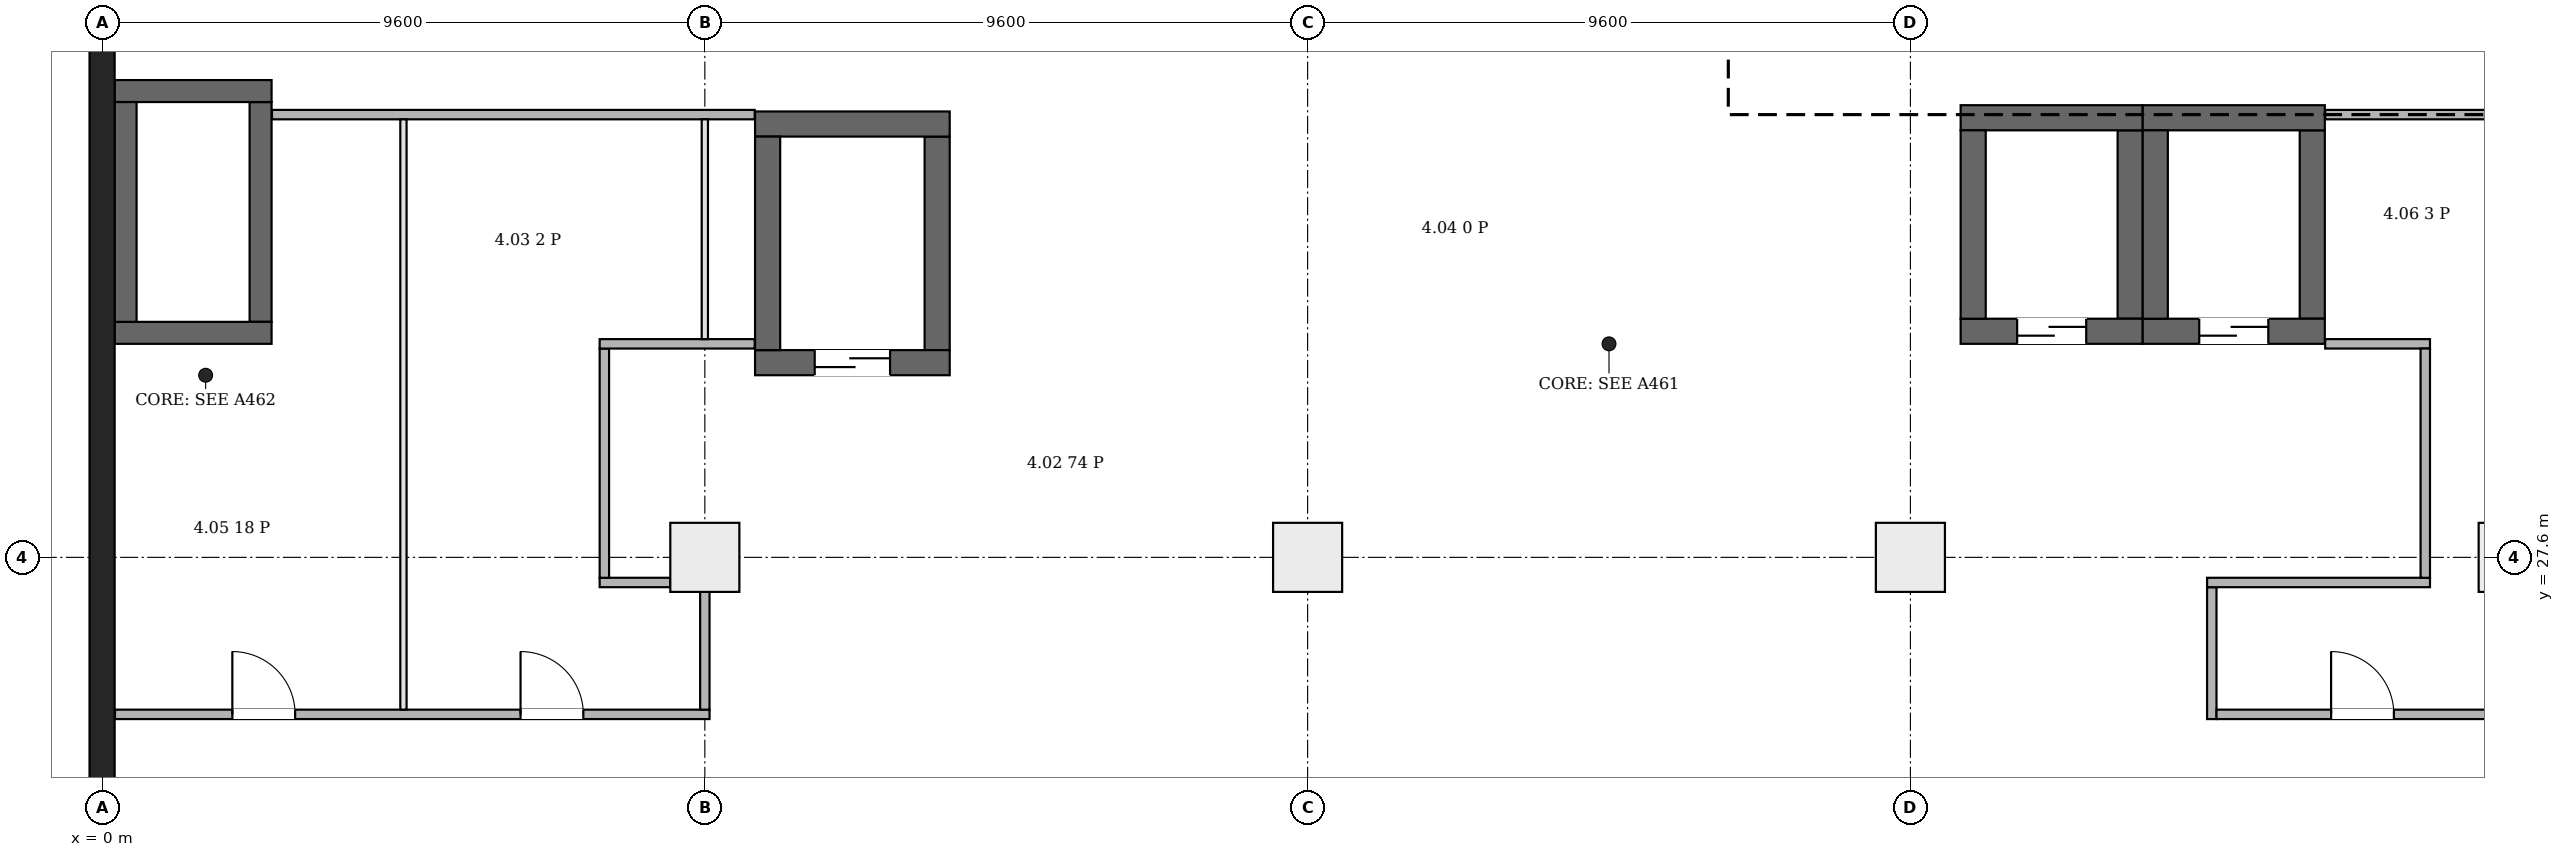
"""IFC4 building model, lengths in metres.
Left out: names, types, materials, properties, quantities, classifications, styles, units other than length and angle.
Written with IfcOpenShell. Run it as: python <this file> out.ifc"""

import sys

from ifc_helpers import new_model, si_unit, direction, frame, frame_2d, origin, origin_2d, place, context, subcontext, project, spatial, rectangle, extrude, element, fill, save


model = new_model("IFC4")
c1 = context("Model", 3, precision=1e-05, world=origin(), true_north=direction((0.0, 1.0)))
c2 = subcontext(c1, "Body", "Model", "MODEL_VIEW")
j1 = project(units=[si_unit("LENGTHUNIT", "METRE"), si_unit("PLANEANGLEUNIT", "RADIAN")], contexts=[c1])
p1 = place(None, origin())
s1 = spatial("IfcSite", under=j1, at=p1, CompositionType="ELEMENT")
p2 = place(p1, origin())
s2 = spatial("IfcBuilding", under=s1, at=p2, CompositionType="ELEMENT")
p3 = place(p2, frame((0.0, 0.0, 26.7)))
s3 = spatial("IfcBuildingStorey", under=s2, at=p3, CompositionType="ELEMENT", Elevation=26.7)
p4 = place(p3, frame((0.0, -0.2, 0.0), z_axis=(0.0, 0.0, 1.0), x_axis=(0.0, 1.0, 0.0)))
e1 = element("IfcWall", 1, at=p4, inside=s3, PredefinedType="SHEAR", context=c2, shape_type="SweptSolid", body=[
    extrude(rectangle(XDim=46.88, YDim=0.4, at=frame_2d((23.44, 0.0))), origin(), (0.0, 0.0, 1.0), 5.2),
])
for number, where, z_axis, x_axis in (
    (2, (0.2, 31.175, 0.0), (0.0, 0.0, 1.0), (1.0, 0.0, 0.0)),
    (3, (0.2, 35.025, 0.0), (0.0, 0.0, 1.0), (1.0, 0.0, 0.0)),
):
    element("IfcWall", number, at=place(p3, frame(where, z_axis=z_axis, x_axis=x_axis)), inside=s3, PredefinedType="SHEAR", context=c2, shape_type="SweptSolid", body=[
        extrude(rectangle(XDim=2.5, YDim=0.35, at=frame_2d((1.25, 0.0))), origin(), (0.0, 0.0, 1.0), 5.2),
    ])
for number, where, z_axis, x_axis in (
    (4, (0.375, 31.35, 0.0), (0.0, 0.0, 1.0), (0.0, 1.0, 0.0)),
    (5, (2.525, 31.35, 0.0), (0.0, 0.0, 1.0), (0.0, 1.0, 0.0)),
):
    element("IfcWall", number, at=place(p3, frame(where, z_axis=z_axis, x_axis=x_axis)), inside=s3, PredefinedType="SHEAR", context=c2, shape_type="SweptSolid", body=[
        extrude(rectangle(XDim=3.5, YDim=0.35, at=frame_2d((1.75, 0.0))), origin(), (0.0, 0.0, 1.0), 5.2),
    ])
p5 = place(p3, frame((10.4, 30.7, 0.0), z_axis=(0.0, 0.0, 1.0), x_axis=(1.0, 0.0, 0.0)))
e6 = element("IfcWall", 6, at=p5, inside=s3, PredefinedType="SHEAR", context=c2, shape_type="SweptSolid", body=[
    extrude(rectangle(XDim=3.1, YDim=0.4, at=frame_2d((1.55, 0.0))), origin(), (0.0, 0.0, 1.0), 5.2),
])
p6 = place(p5, frame((0.95, 0.0, 0.0)))
e7 = element("IfcOpeningElement", 7, at=p6, cuts=e6, PredefinedType="OPENING", context=c2, shape_type="SweptSolid", body=[
    extrude(rectangle(XDim=1.2, YDim=2.1, at=frame_2d((0.6, 1.05))), frame((0.0, 0.21, 0.0), z_axis=(0.0, -1.0, 0.0), x_axis=(1.0, 0.0, 0.0)), (0.0, 0.0, 1.0), 0.42),
])
p7 = place(p3, frame((10.4, 34.5, 0.0), z_axis=(0.0, 0.0, 1.0), x_axis=(1.0, 0.0, 0.0)))
e8 = element("IfcWall", 8, at=p7, inside=s3, PredefinedType="SHEAR", context=c2, shape_type="SweptSolid", body=[
    extrude(rectangle(XDim=3.1, YDim=0.4, at=frame_2d((1.55, 0.0))), origin(), (0.0, 0.0, 1.0), 5.2),
])
for number, where, z_axis, x_axis in (
    (9, (10.6, 30.9, 0.0), (0.0, 0.0, 1.0), (0.0, 1.0, 0.0)),
    (10, (13.3, 30.9, 0.0), (0.0, 0.0, 1.0), (0.0, 1.0, 0.0)),
):
    element("IfcWall", number, at=place(p3, frame(where, z_axis=z_axis, x_axis=x_axis)), inside=s3, PredefinedType="SHEAR", context=c2, shape_type="SweptSolid", body=[
        extrude(rectangle(XDim=3.4, YDim=0.4, at=frame_2d((1.7, 0.0))), origin(), (0.0, 0.0, 1.0), 5.2),
    ])
p8 = place(p3, frame((29.6, 31.2, 0.0), z_axis=(0.0, 0.0, 1.0), x_axis=(1.0, 0.0, 0.0)))
e11 = element("IfcWall", 11, at=p8, inside=s3, PredefinedType="SHEAR", context=c2, shape_type="SweptSolid", body=[
    extrude(rectangle(XDim=2.9, YDim=0.4, at=frame_2d((1.45, 0.0))), origin(), (0.0, 0.0, 1.0), 5.2),
])
p9 = place(p8, frame((0.9, 0.0, 0.0)))
e12 = element("IfcOpeningElement", 12, at=p9, cuts=e11, PredefinedType="OPENING", context=c2, shape_type="SweptSolid", body=[
    extrude(rectangle(XDim=1.1, YDim=2.1, at=frame_2d((0.55, 1.05))), frame((0.0, 0.21, 0.0), z_axis=(0.0, -1.0, 0.0), x_axis=(1.0, 0.0, 0.0)), (0.0, 0.0, 1.0), 0.42),
])
p10 = place(p3, frame((29.6, 34.6, 0.0), z_axis=(0.0, 0.0, 1.0), x_axis=(1.0, 0.0, 0.0)))
e13 = element("IfcWall", 13, at=p10, inside=s3, PredefinedType="SHEAR", context=c2, shape_type="SweptSolid", body=[
    extrude(rectangle(XDim=2.9, YDim=0.4, at=frame_2d((1.45, 0.0))), origin(), (0.0, 0.0, 1.0), 5.2),
])
for number, where, z_axis, x_axis in (
    (14, (29.8, 31.4, 0.0), (0.0, 0.0, 1.0), (0.0, 1.0, 0.0)),
    (15, (32.3, 31.4, 0.0), (0.0, 0.0, 1.0), (0.0, 1.0, 0.0)),
):
    element("IfcWall", number, at=place(p3, frame(where, z_axis=z_axis, x_axis=x_axis)), inside=s3, PredefinedType="SHEAR", context=c2, shape_type="SweptSolid", body=[
        extrude(rectangle(XDim=3.0, YDim=0.4, at=frame_2d((1.5, 0.0))), origin(), (0.0, 0.0, 1.0), 5.2),
    ])
p11 = place(p3, frame((32.5, 31.2, 0.0), z_axis=(0.0, 0.0, 1.0), x_axis=(1.0, 0.0, 0.0)))
e16 = element("IfcWall", 16, at=p11, inside=s3, PredefinedType="SHEAR", context=c2, shape_type="SweptSolid", body=[
    extrude(rectangle(XDim=2.9, YDim=0.4, at=frame_2d((1.45, 0.0))), origin(), (0.0, 0.0, 1.0), 5.2),
])
p12 = place(p11, frame((0.9, 0.0, 0.0)))
e17 = element("IfcOpeningElement", 17, at=p12, cuts=e16, PredefinedType="OPENING", context=c2, shape_type="SweptSolid", body=[
    extrude(rectangle(XDim=1.1, YDim=2.1, at=frame_2d((0.55, 1.05))), frame((0.0, 0.21, 0.0), z_axis=(0.0, -1.0, 0.0), x_axis=(1.0, 0.0, 0.0)), (0.0, 0.0, 1.0), 0.42),
])
p13 = place(p3, frame((32.5, 34.6, 0.0), z_axis=(0.0, 0.0, 1.0), x_axis=(1.0, 0.0, 0.0)))
e18 = element("IfcWall", 18, at=p13, inside=s3, PredefinedType="SHEAR", context=c2, shape_type="SweptSolid", body=[
    extrude(rectangle(XDim=2.9, YDim=0.4, at=frame_2d((1.45, 0.0))), origin(), (0.0, 0.0, 1.0), 5.2),
])
for number, where, z_axis, x_axis in (
    (19, (32.7, 31.4, 0.0), (0.0, 0.0, 1.0), (0.0, 1.0, 0.0)),
    (20, (35.2, 31.4, 0.0), (0.0, 0.0, 1.0), (0.0, 1.0, 0.0)),
):
    element("IfcWall", number, at=place(p3, frame(where, z_axis=z_axis, x_axis=x_axis)), inside=s3, PredefinedType="SHEAR", context=c2, shape_type="SweptSolid", body=[
        extrude(rectangle(XDim=3.0, YDim=0.4, at=frame_2d((1.5, 0.0))), origin(), (0.0, 0.0, 1.0), 5.2),
    ])
for number, where, z_axis, x_axis in (
    (21, (9.6, 27.6, 0.0), (0.0, 0.0, 1.0), (1.0, 0.0, 0.0)),
    (22, (19.2, 27.6, 0.0), (0.0, 0.0, 1.0), (1.0, 0.0, 0.0)),
    (23, (28.8, 27.6, 0.0), (0.0, 0.0, 1.0), (1.0, 0.0, 0.0)),
    (24, (38.4, 27.6, 0.0), (0.0, 0.0, 1.0), (1.0, 0.0, 0.0)),
):
    element("IfcColumn", number, at=place(p3, frame(where, z_axis=z_axis, x_axis=x_axis)), inside=s3, PredefinedType="COLUMN", context=c2, shape_type="SweptSolid", body=[
        extrude(rectangle(XDim=1.1, YDim=1.1, at=origin_2d()), origin(), (0.0, 0.0, 1.0), 5.2),
    ])
p14 = place(p3, frame((0.206, 25.1, 0.0), z_axis=(0.0, 0.0, 1.0), x_axis=(1.0, 0.0, 0.0)))
e25 = element("IfcWall", 25, at=p14, inside=s3, PredefinedType="PARTITIONING", context=c2, shape_type="SweptSolid", body=[
    extrude(rectangle(XDim=9.469, YDim=0.15, at=frame_2d((4.734, 0.0))), origin(), (0.0, 0.0, 1.0), 4.85),
])
p15 = place(p14, frame((1.869, 0.0, 0.0)))
e26 = element("IfcOpeningElement", 26, at=p15, cuts=e25, PredefinedType="OPENING", context=c2, shape_type="SweptSolid", body=[
    extrude(rectangle(XDim=1.0, YDim=2.1, at=frame_2d((0.5, 1.05))), frame((0.0, 0.085, 0.0), z_axis=(0.0, -1.0, 0.0), x_axis=(1.0, 0.0, 0.0)), (0.0, 0.0, 1.0), 0.17),
])
p16 = place(p14, frame((6.459, 0.0, 0.0)))
e27 = element("IfcOpeningElement", 27, at=p16, cuts=e25, PredefinedType="OPENING", context=c2, shape_type="SweptSolid", body=[
    extrude(rectangle(XDim=1.0, YDim=2.1, at=frame_2d((0.5, 1.05))), frame((0.0, 0.085, 0.0), z_axis=(0.0, -1.0, 0.0), x_axis=(1.0, 0.0, 0.0)), (0.0, 0.0, 1.0), 0.17),
])
p17 = place(p3, frame((2.706, 34.65, 0.0), z_axis=(0.0, 0.0, 1.0), x_axis=(1.0, 0.0, 0.0)))
e28 = element("IfcWall", 28, at=p17, inside=s3, PredefinedType="PARTITIONING", context=c2, shape_type="SweptSolid", body=[
    extrude(rectangle(XDim=7.688, YDim=0.15, at=frame_2d((3.844, 0.0))), origin(), (0.0, 0.0, 1.0), 4.85),
])
p18 = place(p3, frame((4.8, 25.175, 0.0), z_axis=(0.0, 0.0, 1.0), x_axis=(0.0, 1.0, 0.0)))
e29 = element("IfcWall", 29, at=p18, inside=s3, PredefinedType="PARTITIONING", context=c2, shape_type="SweptSolid", body=[
    extrude(rectangle(XDim=9.4, YDim=0.1, at=frame_2d((4.7, 0.0))), origin(), (0.0, 0.0, 1.0), 4.85),
])
p19 = place(p3, frame((7.925, 27.2, 0.0), z_axis=(0.0, 0.0, 1.0), x_axis=(1.0, 0.0, 0.0)))
e30 = element("IfcWall", 30, at=p19, inside=s3, PredefinedType="PARTITIONING", context=c2, shape_type="SweptSolid", body=[
    extrude(rectangle(XDim=1.125, YDim=0.15, at=frame_2d((0.562, 0.0))), origin(), (0.0, 0.0, 1.0), 4.85),
])
p20 = place(p3, frame((8.0, 27.275, 0.0), z_axis=(0.0, 0.0, 1.0), x_axis=(0.0, 1.0, 0.0)))
e31 = element("IfcWall", 31, at=p20, inside=s3, PredefinedType="PARTITIONING", context=c2, shape_type="SweptSolid", body=[
    extrude(rectangle(XDim=3.65, YDim=0.15, at=frame_2d((1.825, 0.0))), origin(), (0.0, 0.0, 1.0), 4.85),
])
p21 = place(p3, frame((7.925, 31.0, 0.0), z_axis=(0.0, 0.0, 1.0), x_axis=(1.0, 0.0, 0.0)))
e32 = element("IfcWall", 32, at=p21, inside=s3, PredefinedType="PARTITIONING", context=c2, shape_type="SweptSolid", body=[
    extrude(rectangle(XDim=2.469, YDim=0.15, at=frame_2d((1.234, 0.0))), origin(), (0.0, 0.0, 1.0), 4.85),
])
p22 = place(p3, frame((9.6, 25.175, 0.0), z_axis=(0.0, 0.0, 1.0), x_axis=(0.0, 1.0, 0.0)))
e33 = element("IfcWall", 33, at=p22, inside=s3, PredefinedType="PARTITIONING", context=c2, shape_type="SweptSolid", body=[
    extrude(rectangle(XDim=1.875, YDim=0.15, at=frame_2d((0.938, 0.0))), origin(), (0.0, 0.0, 1.0), 4.45),
])
p23 = place(p3, frame((9.6, 31.075, 0.0), z_axis=(0.0, 0.0, 1.0), x_axis=(0.0, 1.0, 0.0)))
e34 = element("IfcWall", 34, at=p23, inside=s3, PredefinedType="PARTITIONING", context=c2, shape_type="SweptSolid", body=[
    extrude(rectangle(XDim=3.5, YDim=0.1, at=frame_2d((1.75, 0.0))), origin(), (0.0, 0.0, 1.0), 4.45),
])
p24 = place(p3, frame((33.6, 25.025, 0.0), z_axis=(0.0, 0.0, 1.0), x_axis=(0.0, 1.0, 0.0)))
e35 = element("IfcWall", 35, at=p24, inside=s3, PredefinedType="PARTITIONING", context=c2, shape_type="SweptSolid", body=[
    extrude(rectangle(XDim=2.1, YDim=0.15, at=frame_2d((1.05, 0.0))), origin(), (0.0, 0.0, 1.0), 4.85),
])
p25 = place(p3, frame((33.525, 27.2, 0.0), z_axis=(0.0, 0.0, 1.0), x_axis=(1.0, 0.0, 0.0)))
e36 = element("IfcWall", 36, at=p25, inside=s3, PredefinedType="PARTITIONING", context=c2, shape_type="SweptSolid", body=[
    extrude(rectangle(XDim=3.55, YDim=0.15, at=frame_2d((1.775, 0.0))), origin(), (0.0, 0.0, 1.0), 4.85),
])
p26 = place(p3, frame((33.675, 25.1, 0.0), z_axis=(0.0, 0.0, 1.0), x_axis=(1.0, 0.0, 0.0)))
e37 = element("IfcWall", 37, at=p26, inside=s3, PredefinedType="PARTITIONING", context=c2, shape_type="SweptSolid", body=[
    extrude(rectangle(XDim=4.65, YDim=0.15, at=frame_2d((2.325, 0.0))), origin(), (0.0, 0.0, 1.0), 4.85),
])
p27 = place(p26, frame((1.825, 0.0, 0.0)))
e38 = element("IfcOpeningElement", 38, at=p27, cuts=e37, PredefinedType="OPENING", context=c2, shape_type="SweptSolid", body=[
    extrude(rectangle(XDim=1.0, YDim=2.1, at=frame_2d((0.5, 1.05))), frame((0.0, 0.085, 0.0), z_axis=(0.0, -1.0, 0.0), x_axis=(1.0, 0.0, 0.0)), (0.0, 0.0, 1.0), 0.17),
])
p28 = place(p3, frame((35.406, 31.0, 0.0), z_axis=(0.0, 0.0, 1.0), x_axis=(1.0, 0.0, 0.0)))
e39 = element("IfcWall", 39, at=p28, inside=s3, PredefinedType="PARTITIONING", context=c2, shape_type="SweptSolid", body=[
    extrude(rectangle(XDim=1.669, YDim=0.15, at=frame_2d((0.834, 0.0))), origin(), (0.0, 0.0, 1.0), 4.85),
])
p29 = place(p3, frame((35.406, 34.65, 0.0), z_axis=(0.0, 0.0, 1.0), x_axis=(1.0, 0.0, 0.0)))
e40 = element("IfcWall", 40, at=p29, inside=s3, PredefinedType="PARTITIONING", context=c2, shape_type="SweptSolid", body=[
    extrude(rectangle(XDim=21.988, YDim=0.15, at=frame_2d((10.994, 0.0))), origin(), (0.0, 0.0, 1.0), 4.85),
])
p30 = place(p29, frame((4.894, 0.0, 0.0)))
e41 = element("IfcOpeningElement", 41, at=p30, cuts=e40, PredefinedType="OPENING", context=c2, shape_type="SweptSolid", body=[
    extrude(rectangle(XDim=1.0, YDim=2.1, at=frame_2d((0.5, 1.05))), frame((0.0, 0.085, 0.0), z_axis=(0.0, -1.0, 0.0), x_axis=(1.0, 0.0, 0.0)), (0.0, 0.0, 1.0), 0.17),
])
p31 = place(p29, frame((9.694, 0.0, 0.0)))
e42 = element("IfcOpeningElement", 42, at=p31, cuts=e40, PredefinedType="OPENING", context=c2, shape_type="SweptSolid", body=[
    extrude(rectangle(XDim=1.0, YDim=2.1, at=frame_2d((0.5, 1.05))), frame((0.0, 0.085, 0.0), z_axis=(0.0, -1.0, 0.0), x_axis=(1.0, 0.0, 0.0)), (0.0, 0.0, 1.0), 0.17),
])
p32 = place(p29, frame((14.494, 0.0, 0.0)))
e43 = element("IfcOpeningElement", 43, at=p32, cuts=e40, PredefinedType="OPENING", context=c2, shape_type="SweptSolid", body=[
    extrude(rectangle(XDim=1.0, YDim=2.1, at=frame_2d((0.5, 1.05))), frame((0.0, 0.085, 0.0), z_axis=(0.0, -1.0, 0.0), x_axis=(1.0, 0.0, 0.0)), (0.0, 0.0, 1.0), 0.17),
])
p33 = place(p29, frame((19.118, 0.0, 0.0)))
e44 = element("IfcOpeningElement", 44, at=p33, cuts=e40, PredefinedType="OPENING", context=c2, shape_type="SweptSolid", body=[
    extrude(rectangle(XDim=1.0, YDim=2.1, at=frame_2d((0.5, 1.05))), frame((0.0, 0.085, 0.0), z_axis=(0.0, -1.0, 0.0), x_axis=(1.0, 0.0, 0.0)), (0.0, 0.0, 1.0), 0.17),
])
p34 = place(p3, frame((37.0, 27.275, 0.0), z_axis=(0.0, 0.0, 1.0), x_axis=(0.0, 1.0, 0.0)))
e45 = element("IfcWall", 45, at=p34, inside=s3, PredefinedType="PARTITIONING", context=c2, shape_type="SweptSolid", body=[
    extrude(rectangle(XDim=3.65, YDim=0.15, at=frame_2d((1.825, 0.0))), origin(), (0.0, 0.0, 1.0), 4.85),
])
p35 = place(p6, origin())
e46 = element("IfcDoor", 46, at=p35, inside=s3, OperationType="DOUBLE_DOOR_SLIDING", PredefinedType="DOOR", context=c2, shape_type="SweptSolid", body=[
    extrude(rectangle(XDim=1.2, YDim=2.1, at=frame_2d((0.6, 1.05))), frame((0.0, 0.025, 0.0), z_axis=(0.0, -1.0, 0.0), x_axis=(1.0, 0.0, 0.0)), (0.0, 0.0, 1.0), 0.05),
])
fill(e7, e46)
p36 = place(p9, origin())
e47 = element("IfcDoor", 47, at=p36, inside=s3, OperationType="DOUBLE_DOOR_SLIDING", PredefinedType="DOOR", context=c2, shape_type="SweptSolid", body=[
    extrude(rectangle(XDim=1.1, YDim=2.1, at=frame_2d((0.55, 1.05))), frame((0.0, 0.025, 0.0), z_axis=(0.0, -1.0, 0.0), x_axis=(1.0, 0.0, 0.0)), (0.0, 0.0, 1.0), 0.05),
])
fill(e12, e47)
p37 = place(p12, origin())
e48 = element("IfcDoor", 48, at=p37, inside=s3, OperationType="DOUBLE_DOOR_SLIDING", PredefinedType="DOOR", context=c2, shape_type="SweptSolid", body=[
    extrude(rectangle(XDim=1.1, YDim=2.1, at=frame_2d((0.55, 1.05))), frame((0.0, 0.025, 0.0), z_axis=(0.0, -1.0, 0.0), x_axis=(1.0, 0.0, 0.0)), (0.0, 0.0, 1.0), 0.05),
])
fill(e17, e48)
p38 = place(p15, origin())
e49 = element("IfcDoor", 49, at=p38, inside=s3, OperationType="SINGLE_SWING_LEFT", PredefinedType="DOOR", context=c2, shape_type="SweptSolid", body=[
    extrude(rectangle(XDim=1.0, YDim=2.1, at=frame_2d((0.5, 1.05))), frame((0.0, 0.025, 0.0), z_axis=(0.0, -1.0, 0.0), x_axis=(1.0, 0.0, 0.0)), (0.0, 0.0, 1.0), 0.05),
])
fill(e26, e49)
p39 = place(p16, origin())
e50 = element("IfcDoor", 50, at=p39, inside=s3, OperationType="SINGLE_SWING_RIGHT", PredefinedType="DOOR", context=c2, shape_type="SweptSolid", body=[
    extrude(rectangle(XDim=1.0, YDim=2.1, at=frame_2d((0.5, 1.05))), frame((0.0, 0.025, 0.0), z_axis=(0.0, -1.0, 0.0), x_axis=(1.0, 0.0, 0.0)), (0.0, 0.0, 1.0), 0.05),
])
fill(e27, e50)
p40 = place(p27, origin())
e51 = element("IfcDoor", 51, at=p40, inside=s3, OperationType="SINGLE_SWING_LEFT", PredefinedType="DOOR", context=c2, shape_type="SweptSolid", body=[
    extrude(rectangle(XDim=1.0, YDim=2.1, at=frame_2d((0.5, 1.05))), frame((0.0, 0.025, 0.0), z_axis=(0.0, -1.0, 0.0), x_axis=(1.0, 0.0, 0.0)), (0.0, 0.0, 1.0), 0.05),
])
fill(e38, e51)
save(model, sys.argv[1])
